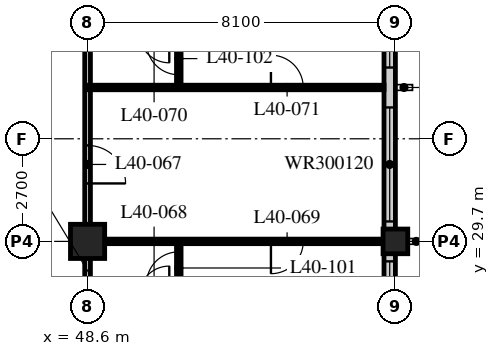
"""IFC4 building model, lengths in metres.
Left out: names, types, materials, properties, quantities, classifications, styles, units other than length and angle.
Written with IfcOpenShell. Run it as: python <this file> out.ifc"""

import sys

from ifc_helpers import new_model, si_unit, direction, frame, frame_2d, origin, origin_2d, place, context, subcontext, project, spatial, rectangle, hollow_rectangle, extrude, element, fill, save


model = new_model("IFC4")
c1 = context("Model", 3, precision=1e-05, world=origin(), true_north=direction((0.0, 1.0)))
c2 = subcontext(c1, "Body", "Model", "MODEL_VIEW")
j1 = project(units=[si_unit("LENGTHUNIT", "METRE"), si_unit("PLANEANGLEUNIT", "RADIAN")], contexts=[c1])
p1 = place(None, origin())
s1 = spatial("IfcSite", under=j1, at=p1, CompositionType="ELEMENT")
p2 = place(p1, origin())
s2 = spatial("IfcBuilding", under=s1, at=p2, CompositionType="ELEMENT")
p3 = place(p2, frame((0.0, 0.0, 154.4)))
s3 = spatial("IfcBuildingStorey", under=s2, at=p3, CompositionType="ELEMENT", Elevation=154.4)
p4 = place(p3, frame((48.6, 29.7, 0.0), z_axis=(0.0, 0.0, 1.0), x_axis=(1.0, 0.0, 0.0)))
e1 = element("IfcColumn", 1, at=p4, inside=s3, PredefinedType="COLUMN", context=c2, shape_type="SweptSolid", body=[
    extrude(hollow_rectangle(XDim=0.9, YDim=0.9, WallThickness=0.1, at=origin_2d()), origin(), (0.0, 0.0, 1.0), 3.4),
])
p5 = place(p3, frame((56.7, 29.7, 0.0), z_axis=(0.0, 0.0, 1.0), x_axis=(1.0, 0.0, 0.0)))
e2 = element("IfcColumn", 2, at=p5, inside=s3, PredefinedType="COLUMN", context=c2, shape_type="SweptSolid", body=[
    extrude(hollow_rectangle(XDim=0.65, YDim=0.65, WallThickness=0.055, at=origin_2d()), origin(), (0.0, 0.0, 1.0), 3.4),
])
p6 = place(p3, frame((56.55, 13.8, 0.0), z_axis=(0.0, 0.0, 1.0), x_axis=(0.0, 1.0, 0.0)))
e3 = element("IfcWall", 3, at=p6, inside=s3, PredefinedType="SOLIDWALL", context=c2, shape_type="SweptSolid", body=[
    extrude(rectangle(XDim=32.1, YDim=0.3, at=frame_2d((16.05, 0.0))), origin(), (0.0, 0.0, 1.0), 2.15),
])
p7 = place(p6, frame((0.225, 0.0, 0.9)))
e4 = element("IfcOpeningElement", 4, at=p7, cuts=e3, PredefinedType="OPENING", context=c2, shape_type="SweptSolid", body=[
    extrude(rectangle(XDim=3.0, YDim=1.2, at=frame_2d((1.5, 0.6))), frame((0.0, 0.16, 0.0), z_axis=(0.0, -1.0, 0.0), x_axis=(1.0, 0.0, 0.0)), (0.0, 0.0, 1.0), 0.32),
])
p8 = place(p6, frame((4.275, 0.0, 0.9)))
e5 = element("IfcOpeningElement", 5, at=p8, cuts=e3, PredefinedType="OPENING", context=c2, shape_type="SweptSolid", body=[
    extrude(rectangle(XDim=3.0, YDim=1.2, at=frame_2d((1.5, 0.6))), frame((0.0, 0.16, 0.0), z_axis=(0.0, -1.0, 0.0), x_axis=(1.0, 0.0, 0.0)), (0.0, 0.0, 1.0), 0.32),
])
p9 = place(p6, frame((8.325, 0.0, 0.9)))
e6 = element("IfcOpeningElement", 6, at=p9, cuts=e3, PredefinedType="OPENING", context=c2, shape_type="SweptSolid", body=[
    extrude(rectangle(XDim=3.0, YDim=1.2, at=frame_2d((1.5, 0.6))), frame((0.0, 0.16, 0.0), z_axis=(0.0, -1.0, 0.0), x_axis=(1.0, 0.0, 0.0)), (0.0, 0.0, 1.0), 0.32),
])
p10 = place(p6, frame((12.375, 0.0, 0.9)))
e7 = element("IfcOpeningElement", 7, at=p10, cuts=e3, PredefinedType="OPENING", context=c2, shape_type="SweptSolid", body=[
    extrude(rectangle(XDim=3.0, YDim=1.2, at=frame_2d((1.5, 0.6))), frame((0.0, 0.16, 0.0), z_axis=(0.0, -1.0, 0.0), x_axis=(1.0, 0.0, 0.0)), (0.0, 0.0, 1.0), 0.32),
])
p11 = place(p6, frame((16.425, 0.0, 0.9)))
e8 = element("IfcOpeningElement", 8, at=p11, cuts=e3, PredefinedType="OPENING", context=c2, shape_type="SweptSolid", body=[
    extrude(rectangle(XDim=3.0, YDim=1.2, at=frame_2d((1.5, 0.6))), frame((0.0, 0.16, 0.0), z_axis=(0.0, -1.0, 0.0), x_axis=(1.0, 0.0, 0.0)), (0.0, 0.0, 1.0), 0.32),
])
p12 = place(p6, frame((20.475, 0.0, 0.9)))
e9 = element("IfcOpeningElement", 9, at=p12, cuts=e3, PredefinedType="OPENING", context=c2, shape_type="SweptSolid", body=[
    extrude(rectangle(XDim=3.0, YDim=1.2, at=frame_2d((1.5, 0.6))), frame((0.0, 0.16, 0.0), z_axis=(0.0, -1.0, 0.0), x_axis=(1.0, 0.0, 0.0)), (0.0, 0.0, 1.0), 0.32),
])
p13 = place(p6, frame((24.525, 0.0, 0.9)))
e10 = element("IfcOpeningElement", 10, at=p13, cuts=e3, PredefinedType="OPENING", context=c2, shape_type="SweptSolid", body=[
    extrude(rectangle(XDim=3.0, YDim=1.2, at=frame_2d((1.5, 0.6))), frame((0.0, 0.16, 0.0), z_axis=(0.0, -1.0, 0.0), x_axis=(1.0, 0.0, 0.0)), (0.0, 0.0, 1.0), 0.32),
])
p14 = place(p6, frame((28.575, 0.0, 0.9)))
e11 = element("IfcOpeningElement", 11, at=p14, cuts=e3, PredefinedType="OPENING", context=c2, shape_type="SweptSolid", body=[
    extrude(rectangle(XDim=3.0, YDim=1.2, at=frame_2d((1.5, 0.6))), frame((0.0, 0.16, 0.0), z_axis=(0.0, -1.0, 0.0), x_axis=(1.0, 0.0, 0.0)), (0.0, 0.0, 1.0), 0.32),
])
p15 = place(p3, frame((48.6, 17.55, 0.0), z_axis=(0.0, 0.0, 1.0), x_axis=(0.0, 1.0, 0.0)))
e12 = element("IfcWall", 12, at=p15, inside=s3, PredefinedType="PARTITIONING", context=c2, shape_type="SweptSolid", body=[
    extrude(rectangle(XDim=28.35, YDim=0.15, at=frame_2d((14.175, 0.0))), origin(), (0.0, 0.0, 1.0), 2.15),
])
p16 = place(p15, frame((0.3, 0.0, 0.0)))
e13 = element("IfcOpeningElement", 13, at=p16, cuts=e12, PredefinedType="OPENING", context=c2, shape_type="SweptSolid", body=[
    extrude(rectangle(XDim=1.0, YDim=2.1, at=frame_2d((0.5, 1.05))), frame((0.0, 0.085, 0.0), z_axis=(0.0, -1.0, 0.0), x_axis=(1.0, 0.0, 0.0)), (0.0, 0.0, 1.0), 0.17),
])
p17 = place(p15, frame((6.5, 0.0, 0.0)))
e14 = element("IfcOpeningElement", 14, at=p17, cuts=e12, PredefinedType="OPENING", context=c2, shape_type="SweptSolid", body=[
    extrude(rectangle(XDim=1.0, YDim=2.1, at=frame_2d((0.5, 1.05))), frame((0.0, 0.085, 0.0), z_axis=(0.0, -1.0, 0.0), x_axis=(1.0, 0.0, 0.0)), (0.0, 0.0, 1.0), 0.17),
])
p18 = place(p15, frame((13.675, 0.0, 0.0)))
e15 = element("IfcOpeningElement", 15, at=p18, cuts=e12, PredefinedType="OPENING", context=c2, shape_type="SweptSolid", body=[
    extrude(rectangle(XDim=1.0, YDim=2.1, at=frame_2d((0.5, 1.05))), frame((0.0, 0.085, 0.0), z_axis=(0.0, -1.0, 0.0), x_axis=(1.0, 0.0, 0.0)), (0.0, 0.0, 1.0), 0.17),
])
p19 = place(p15, frame((22.7, 0.0, 0.0)))
e16 = element("IfcOpeningElement", 16, at=p19, cuts=e12, PredefinedType="OPENING", context=c2, shape_type="SweptSolid", body=[
    extrude(rectangle(XDim=1.0, YDim=2.1, at=frame_2d((0.5, 1.05))), frame((0.0, 0.085, 0.0), z_axis=(0.0, -1.0, 0.0), x_axis=(1.0, 0.0, 0.0)), (0.0, 0.0, 1.0), 0.17),
])
p20 = place(p15, frame((24.9, 0.0, 0.0)))
e17 = element("IfcOpeningElement", 17, at=p20, cuts=e12, PredefinedType="OPENING", context=c2, shape_type="SweptSolid", body=[
    extrude(rectangle(XDim=1.0, YDim=2.1, at=frame_2d((0.5, 1.05))), frame((0.0, 0.085, 0.0), z_axis=(0.0, -1.0, 0.0), x_axis=(1.0, 0.0, 0.0)), (0.0, 0.0, 1.0), 0.17),
])
p21 = place(p3, frame((48.6, 29.7, 0.0), z_axis=(0.0, 0.0, 1.0), x_axis=(1.0, 0.0, 0.0)))
e18 = element("IfcWall", 18, at=p21, inside=s3, PredefinedType="PARTITIONING", context=c2, shape_type="SweptSolid", body=[
    extrude(rectangle(XDim=7.8, YDim=0.12, at=frame_2d((3.9, 0.0))), origin(), (0.0, 0.0, 1.0), 2.38),
])
p22 = place(p21, frame((4.825, 0.0, 0.0)))
e19 = element("IfcOpeningElement", 19, at=p22, cuts=e18, PredefinedType="OPENING", context=c2, shape_type="SweptSolid", body=[
    extrude(rectangle(XDim=0.85, YDim=2.1, at=frame_2d((0.425, 1.05))), frame((0.0, 0.07, 0.0), z_axis=(0.0, -1.0, 0.0), x_axis=(1.0, 0.0, 0.0)), (0.0, 0.0, 1.0), 0.14),
])
p23 = place(p3, frame((48.6, 33.75, 0.0), z_axis=(0.0, 0.0, 1.0), x_axis=(1.0, 0.0, 0.0)))
e20 = element("IfcWall", 20, at=p23, inside=s3, PredefinedType="PARTITIONING", context=c2, shape_type="SweptSolid", body=[
    extrude(rectangle(XDim=7.8, YDim=0.12, at=frame_2d((3.9, 0.0))), origin(), (0.0, 0.0, 1.0), 3.15),
])
p24 = place(p23, frame((4.825, 0.0, 0.0)))
e21 = element("IfcOpeningElement", 21, at=p24, cuts=e20, PredefinedType="OPENING", context=c2, shape_type="SweptSolid", body=[
    extrude(rectangle(XDim=0.85, YDim=2.1, at=frame_2d((0.425, 1.05))), frame((0.0, 0.07, 0.0), z_axis=(0.0, -1.0, 0.0), x_axis=(1.0, 0.0, 0.0)), (0.0, 0.0, 1.0), 0.14),
])
p25 = place(p3, frame((51.0, 29.7, 0.0), z_axis=(0.0, 0.0, 1.0), x_axis=(0.0, -1.0, 0.0)))
e22 = element("IfcWall", 22, at=p25, inside=s3, PredefinedType="PARTITIONING", context=c2, shape_type="SweptSolid", body=[
    extrude(rectangle(XDim=1.46, YDim=0.12, at=frame_2d((0.73, 0.0))), origin(), (0.0, 0.0, 1.0), 3.15),
])
p26 = place(p25, frame((0.275, 0.0, 0.0)))
e23 = element("IfcOpeningElement", 23, at=p26, cuts=e22, PredefinedType="OPENING", context=c2, shape_type="SweptSolid", body=[
    extrude(rectangle(XDim=0.85, YDim=2.1, at=frame_2d((0.425, 1.05))), frame((0.0, 0.07, 0.0), z_axis=(0.0, -1.0, 0.0), x_axis=(1.0, 0.0, 0.0)), (0.0, 0.0, 1.0), 0.14),
])
p27 = place(p3, frame((51.0, 35.21, 0.0), z_axis=(0.0, 0.0, 1.0), x_axis=(0.0, -1.0, 0.0)))
e24 = element("IfcWall", 24, at=p27, inside=s3, PredefinedType="PARTITIONING", context=c2, shape_type="SweptSolid", body=[
    extrude(rectangle(XDim=1.46, YDim=0.12, at=frame_2d((0.73, 0.0))), origin(), (0.0, 0.0, 1.0), 3.15),
])
p28 = place(p27, frame((0.275, 0.0, 0.0)))
e25 = element("IfcOpeningElement", 25, at=p28, cuts=e24, PredefinedType="OPENING", context=c2, shape_type="SweptSolid", body=[
    extrude(rectangle(XDim=0.85, YDim=2.1, at=frame_2d((0.425, 1.05))), frame((0.0, 0.07, 0.0), z_axis=(0.0, -1.0, 0.0), x_axis=(1.0, 0.0, 0.0)), (0.0, 0.0, 1.0), 0.14),
])
p29 = place(p10, origin())
e26 = element("IfcWindow", 26, at=p29, inside=s3, PartitioningType="SINGLE_PANEL", PredefinedType="WINDOW", context=c2, shape_type="SweptSolid", body=[
    extrude(rectangle(XDim=3.0, YDim=1.2, at=frame_2d((1.5, 0.6))), frame((0.0, 0.03, 0.0), z_axis=(0.0, -1.0, 0.0), x_axis=(1.0, 0.0, 0.0)), (0.0, 0.0, 1.0), 0.06),
])
fill(e7, e26)
p30 = place(p11, origin())
e27 = element("IfcWindow", 27, at=p30, inside=s3, PartitioningType="SINGLE_PANEL", PredefinedType="WINDOW", context=c2, shape_type="SweptSolid", body=[
    extrude(rectangle(XDim=3.0, YDim=1.2, at=frame_2d((1.5, 0.6))), frame((0.0, 0.03, 0.0), z_axis=(0.0, -1.0, 0.0), x_axis=(1.0, 0.0, 0.0)), (0.0, 0.0, 1.0), 0.06),
])
fill(e8, e27)
p31 = place(p12, origin())
e28 = element("IfcWindow", 28, at=p31, inside=s3, PartitioningType="SINGLE_PANEL", PredefinedType="WINDOW", context=c2, shape_type="SweptSolid", body=[
    extrude(rectangle(XDim=3.0, YDim=1.2, at=frame_2d((1.5, 0.6))), frame((0.0, 0.03, 0.0), z_axis=(0.0, -1.0, 0.0), x_axis=(1.0, 0.0, 0.0)), (0.0, 0.0, 1.0), 0.06),
])
fill(e9, e28)
p32 = place(p18, origin())
e29 = element("IfcDoor", 29, at=p32, inside=s3, OperationType="SINGLE_SWING_RIGHT", PredefinedType="DOOR", context=c2, shape_type="SweptSolid", body=[
    extrude(rectangle(XDim=1.0, YDim=2.1, at=frame_2d((0.5, 1.05))), frame((0.0, 0.025, 0.0), z_axis=(0.0, -1.0, 0.0), x_axis=(1.0, 0.0, 0.0)), (0.0, 0.0, 1.0), 0.05),
])
fill(e15, e29)
p33 = place(p22, origin())
e30 = element("IfcDoor", 30, at=p33, inside=s3, OperationType="SINGLE_SWING_RIGHT", PredefinedType="DOOR", context=c2, shape_type="SweptSolid", body=[
    extrude(rectangle(XDim=0.85, YDim=2.1, at=frame_2d((0.425, 1.05))), frame((0.0, 0.025, 0.0), z_axis=(0.0, -1.0, 0.0), x_axis=(1.0, 0.0, 0.0)), (0.0, 0.0, 1.0), 0.05),
])
fill(e19, e30)
p34 = place(p24, origin())
e31 = element("IfcDoor", 31, at=p34, inside=s3, OperationType="SINGLE_SWING_LEFT", PredefinedType="DOOR", context=c2, shape_type="SweptSolid", body=[
    extrude(rectangle(XDim=0.85, YDim=2.1, at=frame_2d((0.425, 1.05))), frame((0.0, 0.025, 0.0), z_axis=(0.0, -1.0, 0.0), x_axis=(1.0, 0.0, 0.0)), (0.0, 0.0, 1.0), 0.05),
])
fill(e21, e31)
p35 = place(p26, origin())
e32 = element("IfcDoor", 32, at=p35, inside=s3, OperationType="SINGLE_SWING_LEFT", PredefinedType="DOOR", context=c2, shape_type="SweptSolid", body=[
    extrude(rectangle(XDim=0.85, YDim=2.1, at=frame_2d((0.425, 1.05))), frame((0.0, 0.025, 0.0), z_axis=(0.0, -1.0, 0.0), x_axis=(1.0, 0.0, 0.0)), (0.0, 0.0, 1.0), 0.05),
])
fill(e23, e32)
p36 = place(p28, origin())
e33 = element("IfcDoor", 33, at=p36, inside=s3, OperationType="SINGLE_SWING_RIGHT", PredefinedType="DOOR", context=c2, shape_type="SweptSolid", body=[
    extrude(rectangle(XDim=0.85, YDim=2.1, at=frame_2d((0.425, 1.05))), frame((0.0, 0.025, 0.0), z_axis=(0.0, -1.0, 0.0), x_axis=(1.0, 0.0, 0.0)), (0.0, 0.0, 1.0), 0.05),
])
fill(e25, e33)
save(model, sys.argv[1])
